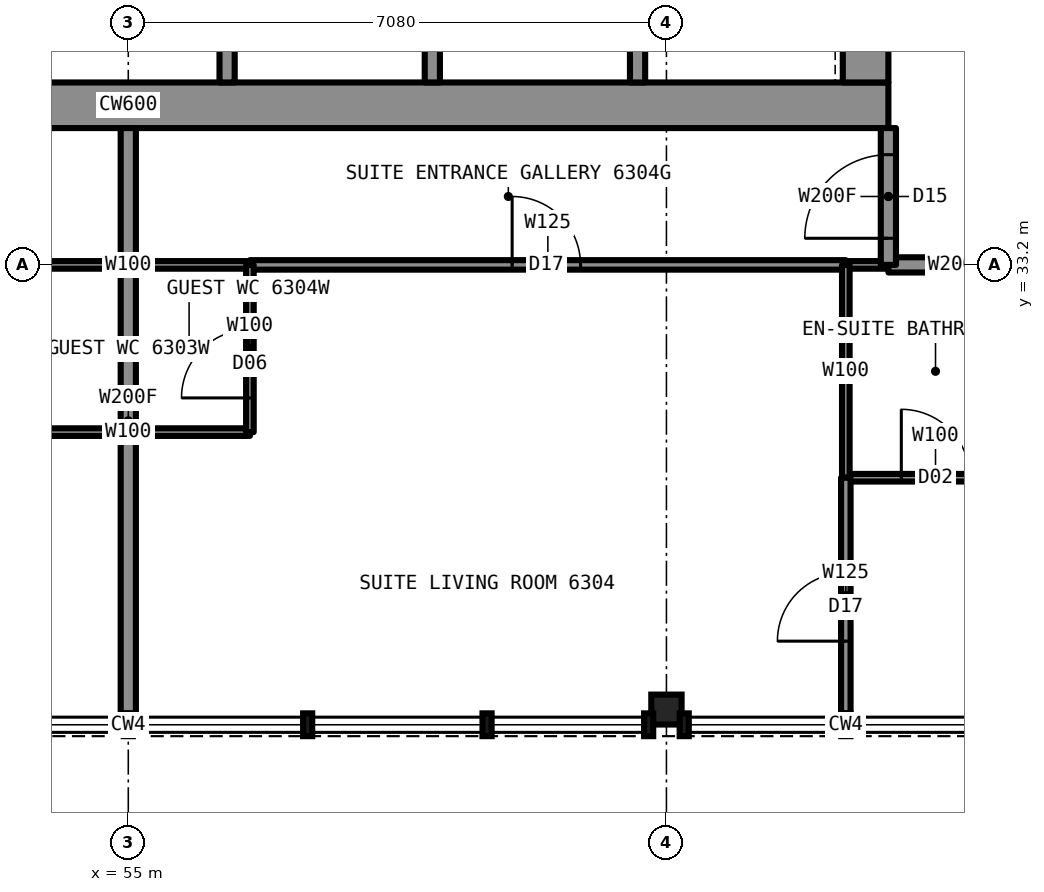
"""IFC4 building model, lengths in metres.
Left out: names, types, materials, properties, quantities, classifications, styles, units other than length and angle.
Written with IfcOpenShell. Run it as: python <this file> out.ifc"""

import sys

from ifc_helpers import new_model, si_unit, direction, frame, frame_2d, origin, origin_2d, place, context, subcontext, project, spatial, rectangle, i_section, extrude, element, fill, save


model = new_model("IFC4")
c1 = context("Model", 3, precision=1e-05, world=origin(), true_north=direction((0.0, 1.0)))
c2 = subcontext(c1, "Body", "Model", "MODEL_VIEW")
j1 = project(units=[si_unit("LENGTHUNIT", "METRE"), si_unit("PLANEANGLEUNIT", "RADIAN")], contexts=[c1])
p1 = place(None, origin())
s1 = spatial("IfcSite", under=j1, at=p1, CompositionType="ELEMENT")
p2 = place(p1, origin())
s2 = spatial("IfcBuilding", under=s1, at=p2, CompositionType="ELEMENT")
p3 = place(p2, frame((0.0, 0.0, 226.7)))
s3 = spatial("IfcBuildingStorey", under=s2, at=p3, CompositionType="ELEMENT", Elevation=226.7)
p4 = place(p3, frame((62.08, 27.35, 0.0), z_axis=(0.0, 0.0, 1.0), x_axis=(1.0, 0.0, 0.0)))
e1 = element("IfcColumn", 1, at=p4, inside=s3, PredefinedType="COLUMN", context=c2, shape_type="SweptSolid", body=[
    extrude(i_section(OverallWidth=0.442, OverallDepth=0.531, WebThickness=0.066, FlangeThickness=0.106, at=origin_2d()), origin(), (0.0, 0.0, 1.0), 3.5),
])
p5 = place(p3, frame((45.0, 35.3, 0.0), z_axis=(0.0, 0.0, 1.0), x_axis=(1.0, 0.0, 0.0)))
e2 = element("IfcWall", 2, at=p5, inside=s3, PredefinedType="SHEAR", context=c2, shape_type="SweptSolid", body=[
    extrude(rectangle(XDim=20.0, YDim=0.6, at=frame_2d((10.0, 0.0))), origin(), (0.0, 0.0, 1.0), 3.5),
])
p6 = place(p3, frame((64.7, 35.6, 0.0), z_axis=(0.0, 0.0, 1.0), x_axis=(0.0, 1.0, 0.0)))
e3 = element("IfcWall", 3, at=p6, inside=s3, PredefinedType="SHEAR", context=c2, shape_type="SweptSolid", body=[
    extrude(rectangle(XDim=18.8, YDim=0.6, at=frame_2d((9.4, 0.0))), origin(), (0.0, 0.0, 1.0), 3.5),
])
p7 = place(p6, frame((13.4, 0.0, 0.0)))
e4 = element("IfcOpeningElement", 4, at=p7, cuts=e3, PredefinedType="OPENING", context=c2, shape_type="SweptSolid", body=[
    extrude(rectangle(XDim=1.8, YDim=2.2, at=frame_2d((0.9, 1.1))), frame((0.0, 0.31, 0.0), z_axis=(0.0, -1.0, 0.0), x_axis=(1.0, 0.0, 0.0)), (0.0, 0.0, 1.0), 0.62),
])
p8 = place(p6, frame((3.6, 0.0, 0.0)))
e5 = element("IfcOpeningElement", 5, at=p8, cuts=e3, PredefinedType="OPENING", context=c2, shape_type="SweptSolid", body=[
    extrude(rectangle(XDim=1.8, YDim=2.2, at=frame_2d((0.9, 1.1))), frame((0.0, 0.31, 0.0), z_axis=(0.0, -1.0, 0.0), x_axis=(1.0, 0.0, 0.0)), (0.0, 0.0, 1.0), 0.62),
])
p9 = place(p3, frame((53.4, 33.2, 0.0), z_axis=(0.0, 0.0, 1.0), x_axis=(1.0, 0.0, 0.0)))
e6 = element("IfcWall", 6, at=p9, inside=s3, PredefinedType="PARTITIONING", context=c2, shape_type="SweptSolid", body=[
    extrude(rectangle(XDim=3.2, YDim=0.1, at=frame_2d((1.6, 0.0))), origin(), (0.0, 0.0, 1.0), 3.33),
])
p10 = place(p3, frame((64.44, 33.2, 0.0), z_axis=(0.0, 0.0, 1.0), x_axis=(1.0, 0.0, 0.0)))
e7 = element("IfcWall", 7, at=p10, inside=s3, PredefinedType="PARTITIONING", context=c2, shape_type="SweptSolid", body=[
    extrude(rectangle(XDim=0.56, YDim=0.1, at=frame_2d((0.28, 0.0))), origin(), (0.0, 0.0, 1.0), 3.33),
])
p11 = place(p3, frame((65.0, 33.2, 0.0), z_axis=(0.0, 0.0, 1.0), x_axis=(1.0, 0.0, 0.0)))
e8 = element("IfcWall", 8, at=p11, inside=s3, PredefinedType="PARTITIONING", context=c2, shape_type="SweptSolid", body=[
    extrude(rectangle(XDim=1.8, YDim=0.2, at=frame_2d((0.9, 0.0))), origin(), (0.0, 0.0, 1.0), 3.33),
])
p12 = place(p3, frame((56.6, 33.2, 0.0), z_axis=(0.0, 0.0, 1.0), x_axis=(1.0, 0.0, 0.0)))
e9 = element("IfcWall", 9, at=p12, inside=s3, PredefinedType="PARTITIONING", context=c2, shape_type="SweptSolid", body=[
    extrude(rectangle(XDim=7.84, YDim=0.125, at=frame_2d((3.92, 0.0))), origin(), (0.0, 0.0, 1.0), 3.33),
])
p13 = place(p12, frame((3.45, 0.0, 0.0)))
e10 = element("IfcOpeningElement", 10, at=p13, cuts=e9, PredefinedType="OPENING", context=c2, shape_type="SweptSolid", body=[
    extrude(rectangle(XDim=0.9, YDim=2.2, at=frame_2d((0.45, 1.1))), frame((0.0, 0.073, 0.0), z_axis=(0.0, -1.0, 0.0), x_axis=(1.0, 0.0, 0.0)), (0.0, 0.0, 1.0), 0.145),
])
p14 = place(p3, frame((53.4, 31.0, 0.0), z_axis=(0.0, 0.0, 1.0), x_axis=(1.0, 0.0, 0.0)))
e11 = element("IfcWall", 11, at=p14, inside=s3, PredefinedType="PARTITIONING", context=c2, shape_type="SweptSolid", body=[
    extrude(rectangle(XDim=3.2, YDim=0.1, at=frame_2d((1.6, 0.0))), origin(), (0.0, 0.0, 1.0), 3.33),
])
p15 = place(p3, frame((64.44, 30.4, 0.0), z_axis=(0.0, 0.0, 1.0), x_axis=(1.0, 0.0, 0.0)))
e12 = element("IfcWall", 12, at=p15, inside=s3, PredefinedType="PARTITIONING", context=c2, shape_type="SweptSolid", body=[
    extrude(rectangle(XDim=2.36, YDim=0.1, at=frame_2d((1.18, 0.0))), origin(), (0.0, 0.0, 1.0), 3.33),
])
p16 = place(p15, frame((0.73, 0.0, 0.0)))
e13 = element("IfcOpeningElement", 13, at=p16, cuts=e12, PredefinedType="OPENING", context=c2, shape_type="SweptSolid", body=[
    extrude(rectangle(XDim=0.9, YDim=2.1, at=frame_2d((0.45, 1.05))), frame((0.0, 0.06, 0.0), z_axis=(0.0, -1.0, 0.0), x_axis=(1.0, 0.0, 0.0)), (0.0, 0.0, 1.0), 0.12),
])
p17 = place(p3, frame((55.0, 27.3, 0.0), z_axis=(0.0, 0.0, 1.0), x_axis=(0.0, 1.0, 0.0)))
e14 = element("IfcWall", 14, at=p17, inside=s3, PredefinedType="PARTITIONING", context=c2, shape_type="SweptSolid", body=[
    extrude(rectangle(XDim=7.7, YDim=0.2, at=frame_2d((3.85, 0.0))), origin(), (0.0, 0.0, 1.0), 2.573),
])
p18 = place(p3, frame((56.6, 31.0, 0.0), z_axis=(0.0, 0.0, 1.0), x_axis=(0.0, 1.0, 0.0)))
e15 = element("IfcWall", 15, at=p18, inside=s3, PredefinedType="PARTITIONING", context=c2, shape_type="SweptSolid", body=[
    extrude(rectangle(XDim=2.2, YDim=0.1, at=frame_2d((1.1, 0.0))), origin(), (0.0, 0.0, 1.0), 3.33),
])
p19 = place(p18, frame((0.45, 0.0, 0.0)))
e16 = element("IfcOpeningElement", 16, at=p19, cuts=e15, PredefinedType="OPENING", context=c2, shape_type="SweptSolid", body=[
    extrude(rectangle(XDim=0.9, YDim=2.1, at=frame_2d((0.45, 1.05))), frame((0.0, 0.06, 0.0), z_axis=(0.0, -1.0, 0.0), x_axis=(1.0, 0.0, 0.0)), (0.0, 0.0, 1.0), 0.12),
])
p20 = place(p3, frame((65.0, 33.2, 0.0), z_axis=(0.0, 0.0, 1.0), x_axis=(0.0, 1.0, 0.0)))
e17 = element("IfcWall", 17, at=p20, inside=s3, PredefinedType="PARTITIONING", context=c2, shape_type="SweptSolid", body=[
    extrude(rectangle(XDim=1.8, YDim=0.2, at=frame_2d((0.9, 0.0))), origin(), (0.0, 0.0, 1.0), 3.33),
])
p21 = place(p20, frame((0.35, 0.0, 0.0)))
e18 = element("IfcOpeningElement", 18, at=p21, cuts=e17, PredefinedType="OPENING", context=c2, shape_type="SweptSolid", body=[
    extrude(rectangle(XDim=1.1, YDim=2.2, at=frame_2d((0.55, 1.1))), frame((0.0, 0.11, 0.0), z_axis=(0.0, -1.0, 0.0), x_axis=(1.0, 0.0, 0.0)), (0.0, 0.0, 1.0), 0.22),
])
p22 = place(p3, frame((64.44, 30.4, 0.0), z_axis=(0.0, 0.0, 1.0), x_axis=(0.0, 1.0, 0.0)))
e19 = element("IfcWall", 19, at=p22, inside=s3, PredefinedType="PARTITIONING", context=c2, shape_type="SweptSolid", body=[
    extrude(rectangle(XDim=2.8, YDim=0.1, at=frame_2d((1.4, 0.0))), origin(), (0.0, 0.0, 1.0), 3.33),
])
p23 = place(p3, frame((64.44, 27.3, 0.0), z_axis=(0.0, 0.0, 1.0), x_axis=(0.0, 1.0, 0.0)))
e20 = element("IfcWall", 20, at=p23, inside=s3, PredefinedType="PARTITIONING", context=c2, shape_type="SweptSolid", body=[
    extrude(rectangle(XDim=3.1, YDim=0.125, at=frame_2d((1.55, 0.0))), origin(), (0.0, 0.0, 1.0), 3.33),
])
p24 = place(p23, frame((0.95, 0.0, 0.0)))
e21 = element("IfcOpeningElement", 21, at=p24, cuts=e20, PredefinedType="OPENING", context=c2, shape_type="SweptSolid", body=[
    extrude(rectangle(XDim=0.9, YDim=2.2, at=frame_2d((0.45, 1.1))), frame((0.0, 0.073, 0.0), z_axis=(0.0, -1.0, 0.0), x_axis=(1.0, 0.0, 0.0)), (0.0, 0.0, 1.0), 0.145),
])
for number, where, z_axis, x_axis in (
    (22, (56.3, 35.6, 0.0), (0.0, 0.0, 1.0), (0.0, 1.0, 0.0)),
    (23, (59.0, 35.6, 0.0), (0.0, 0.0, 1.0), (0.0, 1.0, 0.0)),
    (24, (61.7, 35.6, 0.0), (0.0, 0.0, 1.0), (0.0, 1.0, 0.0)),
):
    element("IfcWall", number, at=place(p3, frame(where, z_axis=z_axis, x_axis=x_axis)), inside=s3, PredefinedType="PARTITIONING", context=c2, shape_type="SweptSolid", body=[
        extrude(rectangle(XDim=2.7, YDim=0.2, at=frame_2d((1.35, 0.0))), origin(), (0.0, 0.0, 1.0), 3.33),
    ])
p25 = place(p13, origin())
e25 = element("IfcDoor", 25, at=p25, inside=s3, OperationType="SINGLE_SWING_LEFT", PredefinedType="DOOR", context=c2, shape_type="SweptSolid", body=[
    extrude(rectangle(XDim=0.9, YDim=2.2, at=frame_2d((0.45, 1.1))), frame((0.0, 0.025, 0.0), z_axis=(0.0, -1.0, 0.0), x_axis=(1.0, 0.0, 0.0)), (0.0, 0.0, 1.0), 0.05),
])
fill(e10, e25)
p26 = place(p16, origin())
e26 = element("IfcDoor", 26, at=p26, inside=s3, OperationType="SINGLE_SWING_RIGHT", PredefinedType="DOOR", context=c2, shape_type="SweptSolid", body=[
    extrude(rectangle(XDim=0.9, YDim=2.1, at=frame_2d((0.45, 1.05))), frame((0.0, 0.025, 0.0), z_axis=(0.0, -1.0, 0.0), x_axis=(1.0, 0.0, 0.0)), (0.0, 0.0, 1.0), 0.05),
])
fill(e13, e26)
p27 = place(p21, origin())
e27 = element("IfcDoor", 27, at=p27, inside=s3, OperationType="SINGLE_SWING_LEFT", PredefinedType="DOOR", context=c2, shape_type="SweptSolid", body=[
    extrude(rectangle(XDim=1.1, YDim=2.2, at=frame_2d((0.55, 1.1))), frame((0.0, 0.025, 0.0), z_axis=(0.0, -1.0, 0.0), x_axis=(1.0, 0.0, 0.0)), (0.0, 0.0, 1.0), 0.05),
])
fill(e18, e27)
p28 = place(p24, origin())
e28 = element("IfcDoor", 28, at=p28, inside=s3, OperationType="SINGLE_SWING_LEFT", PredefinedType="DOOR", context=c2, shape_type="SweptSolid", body=[
    extrude(rectangle(XDim=0.9, YDim=2.2, at=frame_2d((0.45, 1.1))), frame((0.0, 0.025, 0.0), z_axis=(0.0, -1.0, 0.0), x_axis=(1.0, 0.0, 0.0)), (0.0, 0.0, 1.0), 0.05),
])
fill(e21, e28)
p29 = place(p19, origin())
e29 = element("IfcDoor", 29, at=p29, inside=s3, OperationType="SINGLE_SWING_LEFT", PredefinedType="DOOR", context=c2, shape_type="SweptSolid", body=[
    extrude(rectangle(XDim=0.9, YDim=2.1, at=frame_2d((0.45, 1.05))), frame((0.0, 0.025, 0.0), z_axis=(0.0, -1.0, 0.0), x_axis=(1.0, 0.0, 0.0)), (0.0, 0.0, 1.0), 0.05),
])
fill(e16, e29)
save(model, sys.argv[1])
